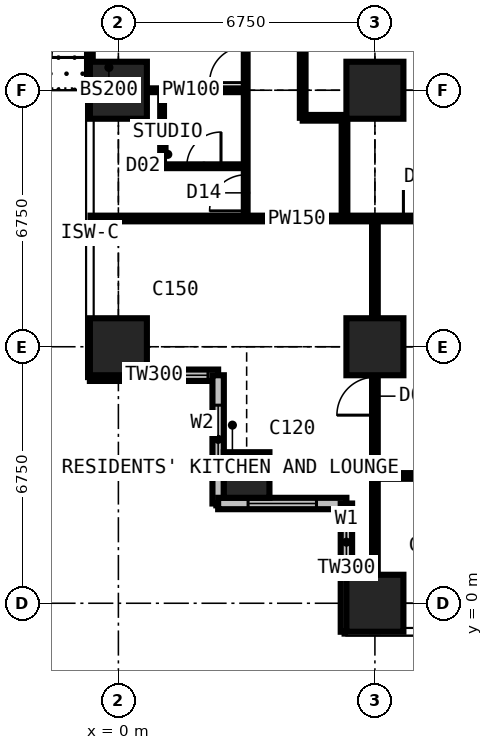
"""IFC4 building model, lengths in metres.
Left out: names, types, materials, properties, quantities, classifications, styles, units other than length and angle.
Written with IfcOpenShell. Run it as: python <this file> out.ifc"""

import sys

from ifc_helpers import new_model, si_unit, direction, frame, frame_2d, origin, origin_2d, place, context, subcontext, project, spatial, rectangle, extrude, element, fill, save


model = new_model("IFC4")
c1 = context("Model", 3, precision=1e-05, world=origin(), true_north=direction((0.0, 1.0)))
c2 = subcontext(c1, "Body", "Model", "MODEL_VIEW")
j1 = project(units=[si_unit("LENGTHUNIT", "METRE"), si_unit("PLANEANGLEUNIT", "RADIAN")], contexts=[c1])
p1 = place(None, origin())
s1 = spatial("IfcSite", under=j1, at=p1, CompositionType="ELEMENT")
p2 = place(p1, origin())
s2 = spatial("IfcBuilding", under=s1, at=p2, CompositionType="ELEMENT")
p3 = place(p2, frame((0.0, 0.0, 156.6)))
s3 = spatial("IfcBuildingStorey", under=s2, at=p3, CompositionType="ELEMENT", Elevation=156.6)
for number, where, z_axis, x_axis in (
    (1, (0.0, 6.75, 0.0), (0.0, 0.0, 1.0), (1.0, 0.0, 0.0)),
    (2, (0.0, 13.5, 0.0), (0.0, 0.0, 1.0), (1.0, 0.0, 0.0)),
):
    element("IfcColumn", number, at=place(p3, frame(where, z_axis=z_axis, x_axis=x_axis)), inside=s3, PredefinedType="COLUMN", context=c2, shape_type="SweptSolid", body=[
        extrude(rectangle(XDim=1.5, YDim=1.5, at=origin_2d()), origin(), (0.0, 0.0, 1.0), 3.6),
    ])
p4 = place(p3, frame((3.375, 3.375, 0.0), z_axis=(0.0, 0.0, 1.0), x_axis=(1.0, 0.0, 0.0)))
e3 = element("IfcColumn", 3, at=p4, inside=s3, PredefinedType="COLUMN", context=c2, shape_type="SweptSolid", body=[
    extrude(rectangle(XDim=1.2, YDim=1.2, at=origin_2d()), origin(), (0.0, 0.0, 1.0), 3.6),
])
for number, where, z_axis, x_axis in (
    (4, (6.75, 0.0, 0.0), (0.0, 0.0, 1.0), (1.0, 0.0, 0.0)),
    (5, (6.75, 6.75, 0.0), (0.0, 0.0, 1.0), (1.0, 0.0, 0.0)),
    (6, (6.75, 13.5, 0.0), (0.0, 0.0, 1.0), (1.0, 0.0, 0.0)),
):
    element("IfcColumn", number, at=place(p3, frame(where, z_axis=z_axis, x_axis=x_axis)), inside=s3, PredefinedType="COLUMN", context=c2, shape_type="SweptSolid", body=[
        extrude(rectangle(XDim=1.5, YDim=1.5, at=origin_2d()), origin(), (0.0, 0.0, 1.0), 3.6),
    ])
p5 = place(p3, frame((-0.75, 13.5, 0.0), z_axis=(0.0, 0.0, 1.0), x_axis=(0.0, 1.0, 0.0)))
e7 = element("IfcWall", 7, at=p5, inside=s3, PredefinedType="SOLIDWALL", context=c2, shape_type="SweptSolid", body=[
    extrude(rectangle(XDim=6.75, YDim=0.15, at=frame_2d((3.375, 0.0))), origin(), (0.0, 0.0, 1.0), 3.375),
])
p6 = place(p5, frame((0.863, 0.0, 0.0)))
e8 = element("IfcOpeningElement", 8, at=p6, cuts=e7, PredefinedType="OPENING", context=c2, shape_type="SweptSolid", body=[
    extrude(rectangle(XDim=1.0, YDim=2.2, at=frame_2d((0.5, 1.1))), frame((0.0, 0.085, 0.0), z_axis=(0.0, -1.0, 0.0), x_axis=(1.0, 0.0, 0.0)), (0.0, 0.0, 1.0), 0.17),
])
p7 = place(p5, frame((1.975, 0.0, 0.9)))
e9 = element("IfcOpeningElement", 9, at=p7, cuts=e7, PredefinedType="OPENING", context=c2, shape_type="SweptSolid", body=[
    extrude(rectangle(XDim=1.2, YDim=1.8, at=frame_2d((0.6, 0.9))), frame((0.0, 0.085, 0.0), z_axis=(0.0, -1.0, 0.0), x_axis=(1.0, 0.0, 0.0)), (0.0, 0.0, 1.0), 0.17),
])
p8 = place(p5, frame((4.887, 0.0, 0.0)))
e10 = element("IfcOpeningElement", 10, at=p8, cuts=e7, PredefinedType="OPENING", context=c2, shape_type="SweptSolid", body=[
    extrude(rectangle(XDim=1.0, YDim=2.2, at=frame_2d((0.5, 1.1))), frame((0.0, 0.085, 0.0), z_axis=(0.0, -1.0, 0.0), x_axis=(1.0, 0.0, 0.0)), (0.0, 0.0, 1.0), 0.17),
])
p9 = place(p5, frame((3.575, 0.0, 0.9)))
e11 = element("IfcOpeningElement", 11, at=p9, cuts=e7, PredefinedType="OPENING", context=c2, shape_type="SweptSolid", body=[
    extrude(rectangle(XDim=1.2, YDim=1.8, at=frame_2d((0.6, 0.9))), frame((0.0, 0.085, 0.0), z_axis=(0.0, -1.0, 0.0), x_axis=(1.0, 0.0, 0.0)), (0.0, 0.0, 1.0), 0.17),
])
p10 = place(p3, frame((-0.75, 6.0, 0.0), z_axis=(0.0, 0.0, 1.0), x_axis=(1.0, 0.0, 0.0)))
e12 = element("IfcWall", 12, at=p10, inside=s3, PredefinedType="SOLIDWALL", context=c2, shape_type="SweptSolid", body=[
    extrude(rectangle(XDim=3.375, YDim=0.3, at=frame_2d((1.688, 0.0))), origin(), (0.0, 0.0, 1.0), 3.375),
])
p11 = place(p10, frame((1.607, 0.0, 0.9)))
e13 = element("IfcOpeningElement", 13, at=p11, cuts=e12, PredefinedType="OPENING", context=c2, shape_type="SweptSolid", body=[
    extrude(rectangle(XDim=1.5, YDim=1.8, at=frame_2d((0.75, 0.9))), frame((0.0, 0.16, 0.0), z_axis=(0.0, -1.0, 0.0), x_axis=(1.0, 0.0, 0.0)), (0.0, 0.0, 1.0), 0.32),
])
p12 = place(p3, frame((2.625, 6.0, 0.0), z_axis=(0.0, 0.0, 1.0), x_axis=(0.0, -1.0, 0.0)))
e14 = element("IfcWall", 14, at=p12, inside=s3, PredefinedType="SOLIDWALL", context=c2, shape_type="SweptSolid", body=[
    extrude(rectangle(XDim=3.375, YDim=0.3, at=frame_2d((1.688, 0.0))), origin(), (0.0, 0.0, 1.0), 3.375),
])
p13 = place(p12, frame((0.788, 0.0, 0.6)))
e15 = element("IfcOpeningElement", 15, at=p13, cuts=e14, PredefinedType="OPENING", context=c2, shape_type="SweptSolid", body=[
    extrude(rectangle(XDim=1.8, YDim=2.1, at=frame_2d((0.9, 1.05))), frame((0.0, 0.16, 0.0), z_axis=(0.0, -1.0, 0.0), x_axis=(1.0, 0.0, 0.0)), (0.0, 0.0, 1.0), 0.32),
])
p14 = place(p3, frame((2.625, 2.625, 0.0), z_axis=(0.0, 0.0, 1.0), x_axis=(1.0, 0.0, 0.0)))
e16 = element("IfcWall", 16, at=p14, inside=s3, PredefinedType="SOLIDWALL", context=c2, shape_type="SweptSolid", body=[
    extrude(rectangle(XDim=3.375, YDim=0.3, at=frame_2d((1.688, 0.0))), origin(), (0.0, 0.0, 1.0), 3.375),
])
p15 = place(p14, frame((0.788, 0.0, 0.6)))
e17 = element("IfcOpeningElement", 17, at=p15, cuts=e16, PredefinedType="OPENING", context=c2, shape_type="SweptSolid", body=[
    extrude(rectangle(XDim=1.8, YDim=2.1, at=frame_2d((0.9, 1.05))), frame((0.0, 0.16, 0.0), z_axis=(0.0, -1.0, 0.0), x_axis=(1.0, 0.0, 0.0)), (0.0, 0.0, 1.0), 0.32),
])
p16 = place(p3, frame((6.0, 2.625, 0.0), z_axis=(0.0, 0.0, 1.0), x_axis=(0.0, -1.0, 0.0)))
e18 = element("IfcWall", 18, at=p16, inside=s3, PredefinedType="SOLIDWALL", context=c2, shape_type="SweptSolid", body=[
    extrude(rectangle(XDim=3.375, YDim=0.3, at=frame_2d((1.688, 0.0))), origin(), (0.0, 0.0, 1.0), 3.375),
])
p17 = place(p16, frame((0.268, 0.0, 0.9)))
e19 = element("IfcOpeningElement", 19, at=p17, cuts=e18, PredefinedType="OPENING", context=c2, shape_type="SweptSolid", body=[
    extrude(rectangle(XDim=1.5, YDim=1.8, at=frame_2d((0.75, 0.9))), frame((0.0, 0.16, 0.0), z_axis=(0.0, -1.0, 0.0), x_axis=(1.0, 0.0, 0.0)), (0.0, 0.0, 1.0), 0.32),
])
p18 = place(p3, frame((-0.734, 10.125, 0.0), z_axis=(0.0, 0.0, 1.0), x_axis=(1.0, 0.0, 0.0)))
e20 = element("IfcWall", 20, at=p18, inside=s3, PredefinedType="PARTITIONING", context=c2, shape_type="SweptSolid", body=[
    extrude(rectangle(XDim=10.859, YDim=0.15, at=frame_2d((5.429, 0.0))), origin(), (0.0, 0.0, 1.0), 3.375),
])
p19 = place(p18, frame((8.234, 0.0, 0.0)))
e21 = element("IfcOpeningElement", 21, at=p19, cuts=e20, PredefinedType="OPENING", context=c2, shape_type="SweptSolid", body=[
    extrude(rectangle(XDim=0.95, YDim=2.2, at=frame_2d((0.475, 1.1))), frame((0.0, 0.085, 0.0), z_axis=(0.0, -1.0, 0.0), x_axis=(1.0, 0.0, 0.0)), (0.0, 0.0, 1.0), 0.17),
])
p20 = place(p3, frame((-0.734, 13.5, 0.0), z_axis=(0.0, 0.0, 1.0), x_axis=(1.0, 0.0, 0.0)))
e22 = element("IfcWall", 22, at=p20, inside=s3, PredefinedType="PARTITIONING", context=c2, shape_type="SweptSolid", body=[
    extrude(rectangle(XDim=4.084, YDim=0.1, at=frame_2d((2.042, 0.0))), origin(), (0.0, 0.0, 1.0), 2.877),
])
p21 = place(p3, frame((1.15, 11.5, 0.0), z_axis=(0.0, 0.0, 1.0), x_axis=(0.0, 1.0, 0.0)))
e23 = element("IfcWall", 23, at=p21, inside=s3, PredefinedType="PARTITIONING", context=c2, shape_type="SweptSolid", body=[
    extrude(rectangle(XDim=2.0, YDim=0.1, at=frame_2d((1.0, 0.0))), origin(), (0.0, 0.0, 1.0), 3.375),
])
p22 = place(p3, frame((1.15, 11.5, 0.0), z_axis=(0.0, 0.0, 1.0), x_axis=(1.0, 0.0, 0.0)))
e24 = element("IfcWall", 24, at=p22, inside=s3, PredefinedType="PARTITIONING", context=c2, shape_type="SweptSolid", body=[
    extrude(rectangle(XDim=2.2, YDim=0.1, at=frame_2d((1.1, 0.0))), origin(), (0.0, 0.0, 1.0), 3.375),
])
p23 = place(p22, frame((0.65, 0.0, 0.0)))
e25 = element("IfcOpeningElement", 25, at=p23, cuts=e24, PredefinedType="OPENING", context=c2, shape_type="SweptSolid", body=[
    extrude(rectangle(XDim=0.9, YDim=2.2, at=frame_2d((0.45, 1.1))), frame((0.0, 0.06, 0.0), z_axis=(0.0, -1.0, 0.0), x_axis=(1.0, 0.0, 0.0)), (0.0, 0.0, 1.0), 0.12),
])
p24 = place(p3, frame((3.35, 10.125, 0.0), z_axis=(0.0, 0.0, 1.0), x_axis=(0.0, 1.0, 0.0)))
e26 = element("IfcWall", 26, at=p24, inside=s3, PredefinedType="PARTITIONING", context=c2, shape_type="SweptSolid", body=[
    extrude(rectangle(XDim=16.875, YDim=0.1, at=frame_2d((8.438, 0.0))), origin(), (0.0, 0.0, 1.0), 3.375),
])
p25 = place(p24, frame((13.7, 0.0, 0.0)))
e27 = element("IfcOpeningElement", 27, at=p25, cuts=e26, PredefinedType="OPENING", context=c2, shape_type="SweptSolid", body=[
    extrude(rectangle(XDim=0.95, YDim=2.2, at=frame_2d((0.475, 1.1))), frame((0.0, 0.06, 0.0), z_axis=(0.0, -1.0, 0.0), x_axis=(1.0, 0.0, 0.0)), (0.0, 0.0, 1.0), 0.12),
])
p26 = place(p24, frame((0.2, 0.0, 0.0)))
e28 = element("IfcOpeningElement", 28, at=p26, cuts=e26, PredefinedType="OPENING", context=c2, shape_type="SweptSolid", body=[
    extrude(rectangle(XDim=0.95, YDim=2.2, at=frame_2d((0.475, 1.1))), frame((0.0, 0.06, 0.0), z_axis=(0.0, -1.0, 0.0), x_axis=(1.0, 0.0, 0.0)), (0.0, 0.0, 1.0), 0.12),
])
p27 = place(p24, frame((3.575, 0.0, 0.0)))
e29 = element("IfcOpeningElement", 29, at=p27, cuts=e26, PredefinedType="OPENING", context=c2, shape_type="SweptSolid", body=[
    extrude(rectangle(XDim=0.95, YDim=2.2, at=frame_2d((0.475, 1.1))), frame((0.0, 0.06, 0.0), z_axis=(0.0, -1.0, 0.0), x_axis=(1.0, 0.0, 0.0)), (0.0, 0.0, 1.0), 0.12),
])
p28 = place(p24, frame((6.95, 0.0, 0.0)))
e30 = element("IfcOpeningElement", 30, at=p28, cuts=e26, PredefinedType="OPENING", context=c2, shape_type="SweptSolid", body=[
    extrude(rectangle(XDim=0.95, YDim=2.2, at=frame_2d((0.475, 1.1))), frame((0.0, 0.06, 0.0), z_axis=(0.0, -1.0, 0.0), x_axis=(1.0, 0.0, 0.0)), (0.0, 0.0, 1.0), 0.12),
])
p29 = place(p24, frame((10.325, 0.0, 0.0)))
e31 = element("IfcOpeningElement", 31, at=p29, cuts=e26, PredefinedType="OPENING", context=c2, shape_type="SweptSolid", body=[
    extrude(rectangle(XDim=0.95, YDim=2.2, at=frame_2d((0.475, 1.1))), frame((0.0, 0.06, 0.0), z_axis=(0.0, -1.0, 0.0), x_axis=(1.0, 0.0, 0.0)), (0.0, 0.0, 1.0), 0.12),
])
p30 = place(p3, frame((4.85, 12.775, 0.0), z_axis=(0.0, 0.0, 1.0), x_axis=(0.0, 1.0, 0.0)))
e32 = element("IfcWall", 32, at=p30, inside=s3, PredefinedType="PARTITIONING", context=c2, shape_type="SweptSolid", body=[
    extrude(rectangle(XDim=8.113, YDim=0.15, at=frame_2d((4.056, 0.0))), origin(), (0.0, 0.0, 1.0), 3.375),
])
p31 = place(p3, frame((4.85, 12.775, 0.0), z_axis=(0.0, 0.0, 1.0), x_axis=(1.0, 0.0, 0.0)))
e33 = element("IfcWall", 33, at=p31, inside=s3, PredefinedType="PARTITIONING", context=c2, shape_type="SweptSolid", body=[
    extrude(rectangle(XDim=1.1, YDim=0.15, at=frame_2d((0.55, 0.0))), origin(), (0.0, 0.0, 1.0), 3.375),
])
p32 = place(p3, frame((5.95, 10.125, 0.0), z_axis=(0.0, 0.0, 1.0), x_axis=(0.0, 1.0, 0.0)))
e34 = element("IfcWall", 34, at=p32, inside=s3, PredefinedType="PARTITIONING", context=c2, shape_type="SweptSolid", body=[
    extrude(rectangle(XDim=2.65, YDim=0.15, at=frame_2d((1.325, 0.0))), origin(), (0.0, 0.0, 1.0), 3.375),
])
p33 = place(p3, frame((6.75, -0.734, 0.0), z_axis=(0.0, 0.0, 1.0), x_axis=(0.0, 1.0, 0.0)))
e35 = element("IfcWall", 35, at=p33, inside=s3, PredefinedType="PARTITIONING", context=c2, shape_type="SweptSolid", body=[
    extrude(rectangle(XDim=10.859, YDim=0.15, at=frame_2d((5.429, 0.0))), origin(), (0.0, 0.0, 1.0), 2.877),
])
p34 = place(p33, frame((5.684, 0.0, 0.0)))
e36 = element("IfcOpeningElement", 36, at=p34, cuts=e35, PredefinedType="OPENING", context=c2, shape_type="SweptSolid", body=[
    extrude(rectangle(XDim=1.0, YDim=2.2, at=frame_2d((0.5, 1.1))), frame((0.0, 0.085, 0.0), z_axis=(0.0, -1.0, 0.0), x_axis=(1.0, 0.0, 0.0)), (0.0, 0.0, 1.0), 0.17),
])
p35 = place(p3, frame((6.75, 3.35, 0.0), z_axis=(0.0, 0.0, 1.0), x_axis=(1.0, 0.0, 0.0)))
e37 = element("IfcWall", 37, at=p35, inside=s3, PredefinedType="PARTITIONING", context=c2, shape_type="SweptSolid", body=[
    extrude(rectangle(XDim=20.25, YDim=0.15, at=frame_2d((10.125, 0.0))), origin(), (0.0, 0.0, 1.0), 3.375),
])
p36 = place(p35, frame((15.1, 0.0, 0.0)))
e38 = element("IfcOpeningElement", 38, at=p36, cuts=e37, PredefinedType="OPENING", context=c2, shape_type="SweptSolid", body=[
    extrude(rectangle(XDim=0.95, YDim=2.2, at=frame_2d((0.475, 1.1))), frame((0.0, 0.085, 0.0), z_axis=(0.0, -1.0, 0.0), x_axis=(1.0, 0.0, 0.0)), (0.0, 0.0, 1.0), 0.17),
])
p37 = place(p35, frame((8.35, 0.0, 0.0)))
e39 = element("IfcOpeningElement", 39, at=p37, cuts=e37, PredefinedType="OPENING", context=c2, shape_type="SweptSolid", body=[
    extrude(rectangle(XDim=0.95, YDim=2.2, at=frame_2d((0.475, 1.1))), frame((0.0, 0.085, 0.0), z_axis=(0.0, -1.0, 0.0), x_axis=(1.0, 0.0, 0.0)), (0.0, 0.0, 1.0), 0.17),
])
p38 = place(p35, frame((1.6, 0.0, 0.0)))
e40 = element("IfcOpeningElement", 40, at=p38, cuts=e37, PredefinedType="OPENING", context=c2, shape_type="SweptSolid", body=[
    extrude(rectangle(XDim=0.95, YDim=2.2, at=frame_2d((0.475, 1.1))), frame((0.0, 0.085, 0.0), z_axis=(0.0, -1.0, 0.0), x_axis=(1.0, 0.0, 0.0)), (0.0, 0.0, 1.0), 0.17),
])
p39 = place(p6, origin())
e41 = element("IfcDoor", 41, at=p39, inside=s3, OperationType="SINGLE_SWING_LEFT", PredefinedType="DOOR", context=c2, shape_type="SweptSolid", body=[
    extrude(rectangle(XDim=1.0, YDim=2.2, at=frame_2d((0.5, 1.1))), frame((0.0, 0.025, 0.0), z_axis=(0.0, -1.0, 0.0), x_axis=(1.0, 0.0, 0.0)), (0.0, 0.0, 1.0), 0.05),
])
fill(e8, e41)
p40 = place(p11, origin())
e42 = element("IfcWindow", 42, at=p40, inside=s3, PartitioningType="SINGLE_PANEL", PredefinedType="WINDOW", context=c2, shape_type="SweptSolid", body=[
    extrude(rectangle(XDim=1.5, YDim=1.8, at=frame_2d((0.75, 0.9))), frame((0.0, 0.03, 0.0), z_axis=(0.0, -1.0, 0.0), x_axis=(1.0, 0.0, 0.0)), (0.0, 0.0, 1.0), 0.06),
])
fill(e13, e42)
p41 = place(p13, origin())
e43 = element("IfcWindow", 43, at=p41, inside=s3, PartitioningType="SINGLE_PANEL", PredefinedType="WINDOW", context=c2, shape_type="SweptSolid", body=[
    extrude(rectangle(XDim=1.8, YDim=2.1, at=frame_2d((0.9, 1.05))), frame((0.0, 0.03, 0.0), z_axis=(0.0, -1.0, 0.0), x_axis=(1.0, 0.0, 0.0)), (0.0, 0.0, 1.0), 0.06),
])
fill(e15, e43)
p42 = place(p15, origin())
e44 = element("IfcWindow", 44, at=p42, inside=s3, PartitioningType="SINGLE_PANEL", PredefinedType="WINDOW", context=c2, shape_type="SweptSolid", body=[
    extrude(rectangle(XDim=1.8, YDim=2.1, at=frame_2d((0.9, 1.05))), frame((0.0, 0.03, 0.0), z_axis=(0.0, -1.0, 0.0), x_axis=(1.0, 0.0, 0.0)), (0.0, 0.0, 1.0), 0.06),
])
fill(e17, e44)
p43 = place(p17, origin())
e45 = element("IfcWindow", 45, at=p43, inside=s3, PartitioningType="SINGLE_PANEL", PredefinedType="WINDOW", context=c2, shape_type="SweptSolid", body=[
    extrude(rectangle(XDim=1.5, YDim=1.8, at=frame_2d((0.75, 0.9))), frame((0.0, 0.03, 0.0), z_axis=(0.0, -1.0, 0.0), x_axis=(1.0, 0.0, 0.0)), (0.0, 0.0, 1.0), 0.06),
])
fill(e19, e45)
p44 = place(p34, origin())
e46 = element("IfcDoor", 46, at=p44, inside=s3, OperationType="SINGLE_SWING_LEFT", PredefinedType="DOOR", context=c2, shape_type="SweptSolid", body=[
    extrude(rectangle(XDim=1.0, YDim=2.2, at=frame_2d((0.5, 1.1))), frame((0.0, 0.025, 0.0), z_axis=(0.0, -1.0, 0.0), x_axis=(1.0, 0.0, 0.0)), (0.0, 0.0, 1.0), 0.05),
])
fill(e36, e46)
p45 = place(p26, origin())
e47 = element("IfcDoor", 47, at=p45, inside=s3, OperationType="SINGLE_SWING_LEFT", PredefinedType="DOOR", context=c2, shape_type="SweptSolid", body=[
    extrude(rectangle(XDim=0.95, YDim=2.2, at=frame_2d((0.475, 1.1))), frame((0.0, 0.025, 0.0), z_axis=(0.0, -1.0, 0.0), x_axis=(1.0, 0.0, 0.0)), (0.0, 0.0, 1.0), 0.05),
])
fill(e28, e47)
p46 = place(p23, origin())
e48 = element("IfcDoor", 48, at=p46, inside=s3, OperationType="SINGLE_SWING_RIGHT", PredefinedType="DOOR", context=c2, shape_type="SweptSolid", body=[
    extrude(rectangle(XDim=0.9, YDim=2.2, at=frame_2d((0.45, 1.1))), frame((0.0, 0.025, 0.0), z_axis=(0.0, -1.0, 0.0), x_axis=(1.0, 0.0, 0.0)), (0.0, 0.0, 1.0), 0.05),
])
fill(e25, e48)
p47 = place(p27, origin())
e49 = element("IfcDoor", 49, at=p47, inside=s3, OperationType="SINGLE_SWING_LEFT", PredefinedType="DOOR", context=c2, shape_type="SweptSolid", body=[
    extrude(rectangle(XDim=0.95, YDim=2.2, at=frame_2d((0.475, 1.1))), frame((0.0, 0.025, 0.0), z_axis=(0.0, -1.0, 0.0), x_axis=(1.0, 0.0, 0.0)), (0.0, 0.0, 1.0), 0.05),
])
fill(e29, e49)
p48 = place(p19, origin())
e50 = element("IfcDoor", 50, at=p48, inside=s3, OperationType="SINGLE_SWING_LEFT", PredefinedType="DOOR", context=c2, shape_type="SweptSolid", body=[
    extrude(rectangle(XDim=0.95, YDim=2.2, at=frame_2d((0.475, 1.1))), frame((0.0, 0.025, 0.0), z_axis=(0.0, -1.0, 0.0), x_axis=(1.0, 0.0, 0.0)), (0.0, 0.0, 1.0), 0.05),
])
fill(e21, e50)
save(model, sys.argv[1])
